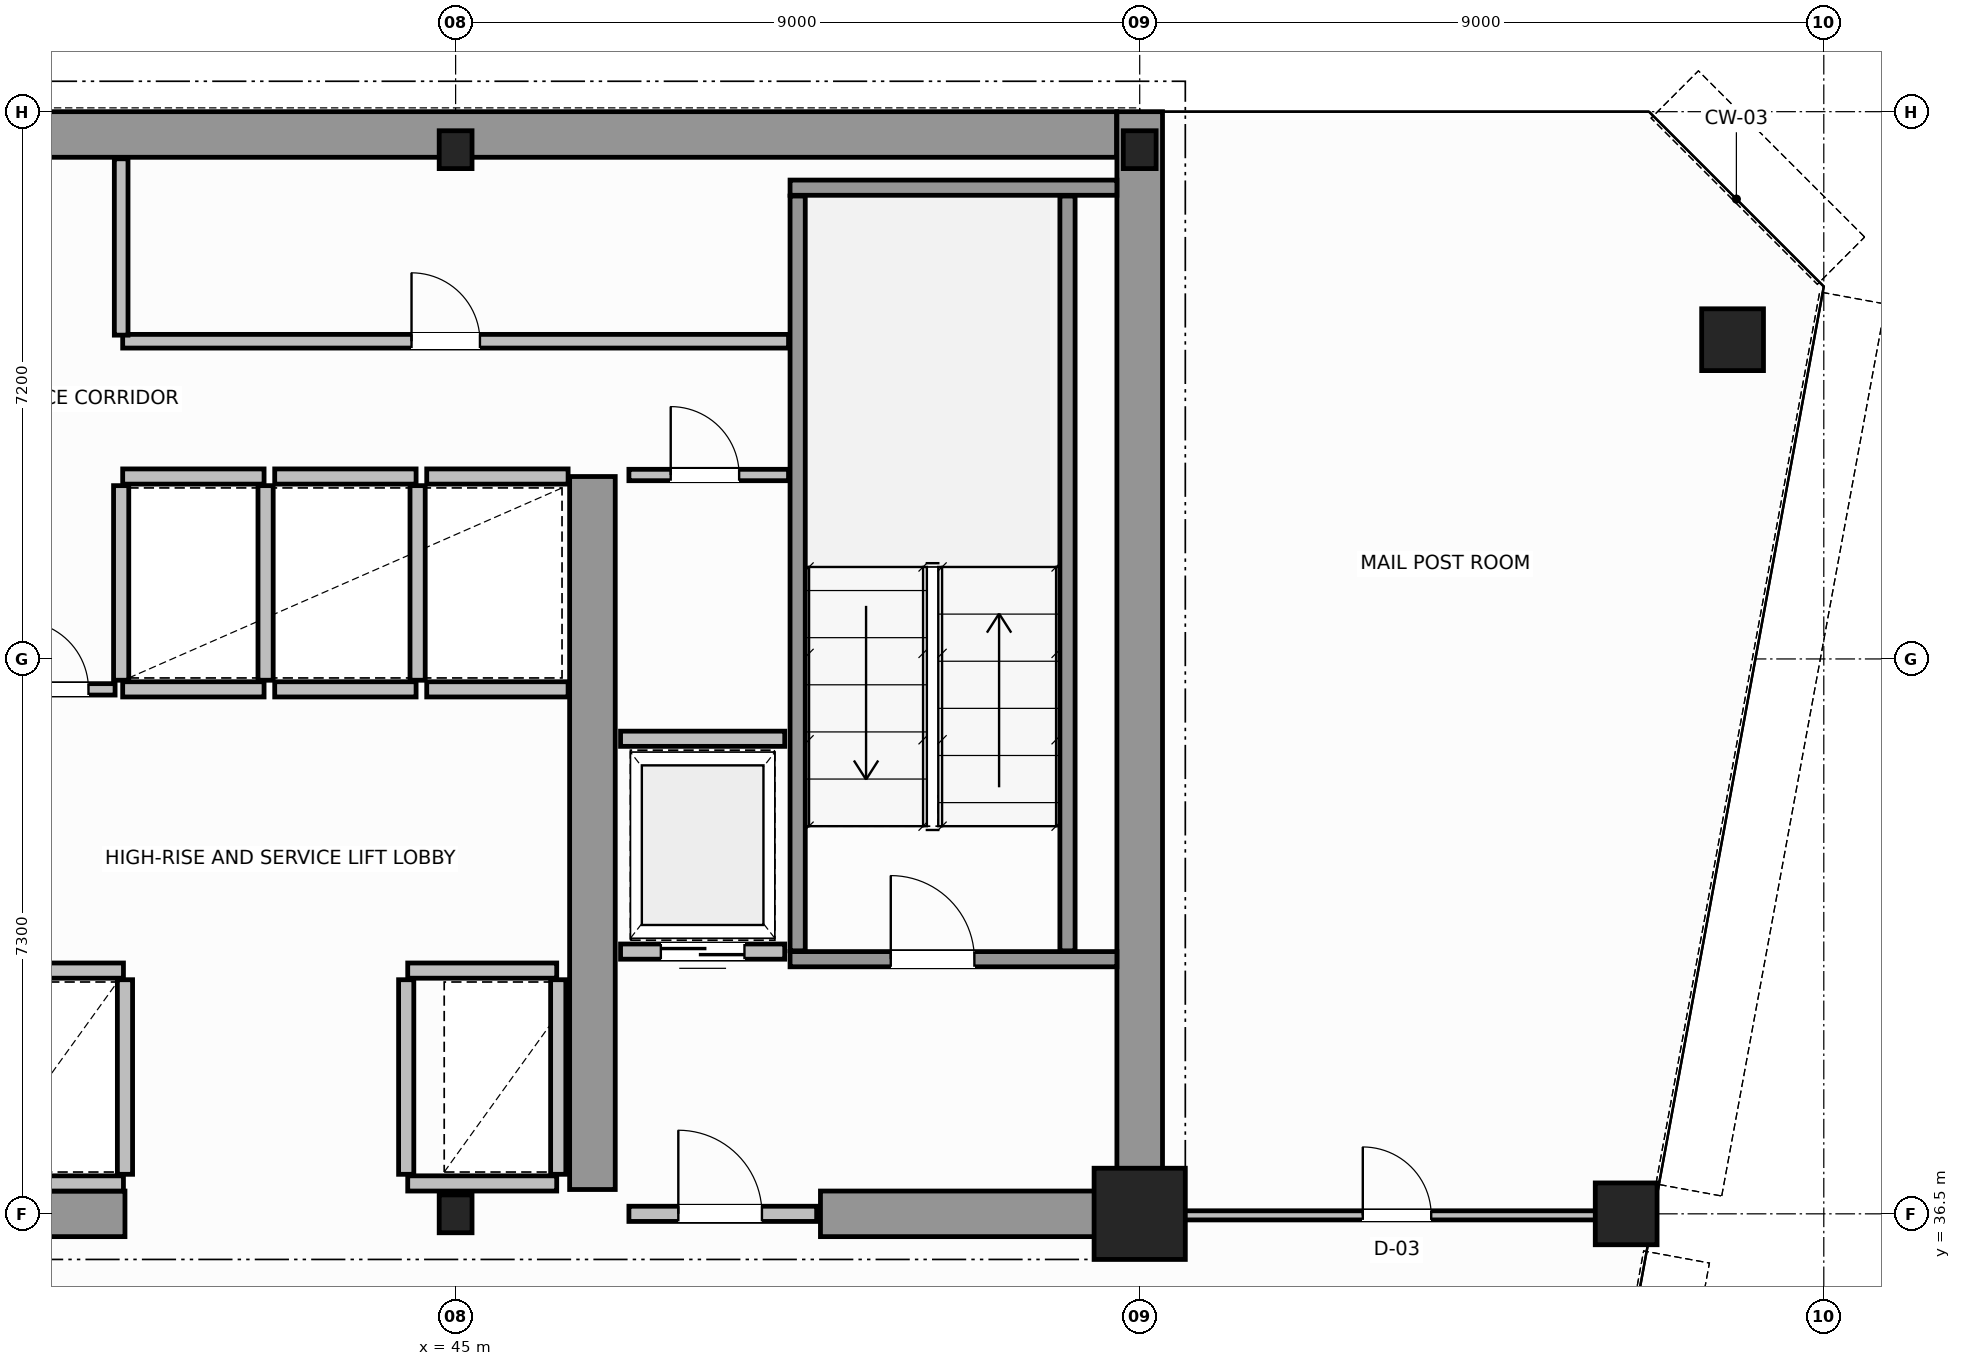
"""IFC4 building model, lengths in metres.
Left out: names, types, materials, properties, quantities, classifications, styles, units other than length and angle.
Written with IfcOpenShell. Run it as: python <this file> out.ifc"""

import sys

from ifc_helpers import new_model, si_unit, direction, frame, frame_2d, origin, origin_2d, place, context, subcontext, project, spatial, rectangle, hollow_circle, i_section, extrude, source, transform, mapped, element, fill, save


model = new_model("IFC4")
c1 = context("Model", 3, precision=1e-05, world=origin(), true_north=direction((0.0, 1.0)))
c2 = subcontext(c1, "Body", "Model", "MODEL_VIEW")
j1 = project(units=[si_unit("LENGTHUNIT", "METRE"), si_unit("PLANEANGLEUNIT", "RADIAN")], contexts=[c1])
p1 = place(None, origin())
s1 = spatial("IfcSite", under=j1, at=p1, CompositionType="ELEMENT")
p2 = place(p1, origin())
s2 = spatial("IfcBuilding", under=s1, at=p2, CompositionType="ELEMENT")
p3 = place(p2, frame((0.0, 0.0, 180.4)))
s3 = spatial("IfcBuildingStorey", under=s2, at=p3, CompositionType="ELEMENT", Elevation=180.4)
m1 = source(origin(), c2, "Body", "SweptSolid", [
    extrude(i_section(OverallWidth=0.432, OverallDepth=0.498, WebThickness=0.055, FlangeThickness=0.068, FilletRadius=0.015, at=origin_2d()), origin(), (0.0, 0.0, 1.0), 3.8),
])
p4 = place(p3, frame((45.0, 36.5, 0.0), z_axis=(0.0, 0.0, 1.0), x_axis=(1.0, 0.0, 0.0)))
e1 = element("IfcColumn", 1, at=p4, inside=s3, PredefinedType="COLUMN", context=c2, shape_type="MappedRepresentation", body=[
    mapped(m1, transform((0.0, 0.0, 0.0), scale=1.0)),
])
m2 = source(origin(), c2, "Body", "SweptSolid", [
    extrude(rectangle(XDim=1.2, YDim=1.2, at=origin_2d()), origin(), (0.0, 0.0, 1.0), 3.8),
])
p5 = place(p3, frame((54.0, 36.5, 0.0), z_axis=(0.0, 0.0, 1.0), x_axis=(1.0, 0.0, 0.0)))
e2 = element("IfcColumn", 2, at=p5, inside=s3, PredefinedType="COLUMN", context=c2, shape_type="MappedRepresentation", body=[
    mapped(m2, transform((0.0, 0.0, 0.0), scale=1.0)),
])
for number, where, z_axis, x_axis in (
    (3, (45.0, 50.5, 0.0), (0.0, 0.0, 1.0), (1.0, 0.0, 0.0)),
    (4, (54.0, 50.5, 0.0), (0.0, 0.0, 1.0), (1.0, 0.0, 0.0)),
):
    element("IfcColumn", number, at=place(p3, frame(where, z_axis=z_axis, x_axis=x_axis)), inside=s3, PredefinedType="COLUMN", context=c2, shape_type="MappedRepresentation", body=[
        mapped(m1, transform((0.0, 0.0, 0.0), scale=1.0)),
    ])
m3 = source(origin(), c2, "Body", "SweptSolid", [
    extrude(hollow_circle(Radius=0.406, WallThickness=0.04, at=origin_2d()), origin(), (0.0, 0.0, 1.0), 3.8),
])
for number, where, z_axis, x_axis in (
    (5, (61.8, 48.0, 0.0), (0.0, 0.0, 1.0), (1.0, 0.0, 0.0)),
    (6, (60.4, 36.5, 0.0), (0.0, 0.0, 1.0), (1.0, 0.0, 0.0)),
):
    element("IfcColumn", number, at=place(p3, frame(where, z_axis=z_axis, x_axis=x_axis)), inside=s3, PredefinedType="COLUMN", context=c2, shape_type="MappedRepresentation", body=[
        mapped(m3, transform((0.0, 0.0, 0.0), scale=1.0)),
    ])
p6 = place(p3, frame((34.002, 50.7, 0.0), z_axis=(0.0, 0.0, 1.0), x_axis=(1.0, 0.0, 0.0)))
e7 = element("IfcWall", 7, at=p6, inside=s3, PredefinedType="SHEAR", context=c2, shape_type="SweptSolid", body=[
    extrude(rectangle(XDim=19.694, YDim=0.6, at=frame_2d((9.847, 0.0))), origin(), (0.0, 0.0, 1.0), 3.8),
])
p7 = place(p3, frame((54.0, 36.5, 0.0), z_axis=(0.0, 0.0, 1.0), x_axis=(0.0, 1.0, 0.0)))
e8 = element("IfcWall", 8, at=p7, inside=s3, PredefinedType="SHEAR", context=c2, shape_type="SweptSolid", body=[
    extrude(rectangle(XDim=14.5, YDim=0.6, at=frame_2d((7.25, 0.0))), origin(), (0.0, 0.0, 1.0), 3.8),
])
p8 = place(p3, frame((36.15, 36.5, 0.0), z_axis=(0.0, 0.0, 1.0), x_axis=(1.0, 0.0, 0.0)))
e9 = element("IfcWall", 9, at=p8, inside=s3, PredefinedType="SHEAR", context=c2, shape_type="SweptSolid", body=[
    extrude(rectangle(XDim=4.5, YDim=0.6, at=frame_2d((2.25, 0.0))), origin(), (0.0, 0.0, 1.0), 3.8),
])
p9 = place(p3, frame((49.8, 36.5, 0.0), z_axis=(0.0, 0.0, 1.0), x_axis=(1.0, 0.0, 0.0)))
e10 = element("IfcWall", 10, at=p9, inside=s3, PredefinedType="SHEAR", context=c2, shape_type="SweptSolid", body=[
    extrude(rectangle(XDim=3.88, YDim=0.6, at=frame_2d((1.94, 0.0))), origin(), (0.0, 0.0, 1.0), 2.58),
])
p10 = place(p3, frame((46.8, 36.82, 0.0), z_axis=(0.0, 0.0, 1.0), x_axis=(0.0, 1.0, 0.0)))
e11 = element("IfcWall", 11, at=p10, inside=s3, PredefinedType="SHEAR", context=c2, shape_type="SweptSolid", body=[
    extrude(rectangle(XDim=9.38, YDim=0.6, at=frame_2d((4.69, 0.0))), origin(), (0.0, 0.0, 1.0), 3.8),
])
p11 = place(p3, frame((49.4, 39.85, 0.0), z_axis=(0.0, 0.0, 1.0), x_axis=(1.0, 0.0, 0.0)))
e12 = element("IfcWall", 12, at=p11, inside=s3, PredefinedType="SOLIDWALL", context=c2, shape_type="SweptSolid", body=[
    extrude(rectangle(XDim=4.3, YDim=0.2, at=frame_2d((2.15, 0.0))), origin(), (0.0, 0.0, 1.0), 3.8),
])
p12 = place(p11, frame((1.325, 0.0, 0.0)))
e13 = element("IfcOpeningElement", 13, at=p12, cuts=e12, PredefinedType="OPENING", context=c2, shape_type="SweptSolid", body=[
    extrude(rectangle(XDim=1.1, YDim=2.15, at=frame_2d((0.55, 1.075))), frame((0.0, 0.11, 0.0), z_axis=(0.0, -1.0, 0.0), x_axis=(1.0, 0.0, 0.0)), (0.0, 0.0, 1.0), 0.22),
])
p13 = place(p3, frame((49.4, 50.0, 0.0), z_axis=(0.0, 0.0, 1.0), x_axis=(1.0, 0.0, 0.0)))
e14 = element("IfcWall", 14, at=p13, inside=s3, PredefinedType="SOLIDWALL", context=c2, shape_type="SweptSolid", body=[
    extrude(rectangle(XDim=4.3, YDim=0.2, at=frame_2d((2.15, 0.0))), origin(), (0.0, 0.0, 1.0), 3.8),
])
for number, where, z_axis, x_axis in (
    (15, (49.5, 39.96, 0.0), (0.0, 0.0, 1.0), (0.0, 1.0, 0.0)),
    (16, (53.05, 39.96, 0.0), (0.0, 0.0, 1.0), (0.0, 1.0, 0.0)),
):
    element("IfcWall", number, at=place(p3, frame(where, z_axis=z_axis, x_axis=x_axis)), inside=s3, PredefinedType="SOLIDWALL", context=c2, shape_type="SweptSolid", body=[
        extrude(rectangle(XDim=9.93, YDim=0.2, at=frame_2d((4.965, 0.0))), origin(), (0.0, 0.0, 1.0), 3.8),
    ])
p14 = place(p3, frame((47.28, 36.5, 0.0), z_axis=(0.0, 0.0, 1.0), x_axis=(1.0, 0.0, 0.0)))
e17 = element("IfcWall", 17, at=p14, inside=s3, PredefinedType="SOLIDWALL", context=c2, shape_type="SweptSolid", body=[
    extrude(rectangle(XDim=2.47, YDim=0.2, at=frame_2d((1.235, 0.0))), origin(), (0.0, 0.0, 1.0), 2.57),
])
p15 = place(p14, frame((0.65, 0.0, 0.0)))
e18 = element("IfcOpeningElement", 18, at=p15, cuts=e17, PredefinedType="OPENING", context=c2, shape_type="SweptSolid", body=[
    extrude(rectangle(XDim=1.1, YDim=2.15, at=frame_2d((0.55, 1.075))), frame((0.0, 0.11, 0.0), z_axis=(0.0, -1.0, 0.0), x_axis=(1.0, 0.0, 0.0)), (0.0, 0.0, 1.0), 0.22),
])
for number, where, z_axis, x_axis in (
    (19, (38.71, 39.7, 0.0), (0.0, 0.0, 1.0), (1.0, 0.0, 0.0)),
    (20, (38.71, 36.9, 0.0), (0.0, 0.0, 1.0), (1.0, 0.0, 0.0)),
):
    element("IfcWall", number, at=place(p3, frame(where, z_axis=z_axis, x_axis=x_axis)), inside=s3, PredefinedType="SOLIDWALL", context=c2, shape_type="SweptSolid", body=[
        extrude(rectangle(XDim=1.92, YDim=0.2, at=frame_2d((0.96, 0.0))), origin(), (0.0, 0.0, 1.0), 3.58),
    ])
p16 = place(p3, frame((40.65, 37.02, 0.0), z_axis=(0.0, 0.0, 1.0), x_axis=(0.0, 1.0, 0.0)))
e21 = element("IfcWall", 21, at=p16, inside=s3, PredefinedType="SOLIDWALL", context=c2, shape_type="SweptSolid", body=[
    extrude(rectangle(XDim=2.56, YDim=0.2, at=frame_2d((1.28, 0.0))), origin(), (0.0, 0.0, 1.0), 3.58),
])
p17 = place(p3, frame((44.37, 39.7, 0.0), z_axis=(0.0, 0.0, 1.0), x_axis=(1.0, 0.0, 0.0)))
e22 = element("IfcWall", 22, at=p17, inside=s3, PredefinedType="SOLIDWALL", context=c2, shape_type="SweptSolid", body=[
    extrude(rectangle(XDim=1.96, YDim=0.2, at=frame_2d((0.98, 0.0))), origin(), (0.0, 0.0, 1.0), 3.58),
])
p18 = place(p3, frame((44.37, 36.9, 0.0), z_axis=(0.0, 0.0, 1.0), x_axis=(1.0, 0.0, 0.0)))
e23 = element("IfcWall", 23, at=p18, inside=s3, PredefinedType="SOLIDWALL", context=c2, shape_type="SweptSolid", body=[
    extrude(rectangle(XDim=1.96, YDim=0.2, at=frame_2d((0.98, 0.0))), origin(), (0.0, 0.0, 1.0), 2.57),
])
for number, where, z_axis, x_axis in (
    (24, (44.35, 37.02, 0.0), (0.0, 0.0, 1.0), (0.0, 1.0, 0.0)),
    (25, (46.35, 37.02, 0.0), (0.0, 0.0, 1.0), (0.0, 1.0, 0.0)),
):
    element("IfcWall", number, at=place(p3, frame(where, z_axis=z_axis, x_axis=x_axis)), inside=s3, PredefinedType="SOLIDWALL", context=c2, shape_type="SweptSolid", body=[
        extrude(rectangle(XDim=2.56, YDim=0.2, at=frame_2d((1.28, 0.0))), origin(), (0.0, 0.0, 1.0), 3.58),
    ])
for number, where, z_axis, x_axis in (
    (26, (40.62, 43.4, 0.0), (0.0, 0.0, 1.0), (1.0, 0.0, 0.0)),
    (27, (40.62, 46.2, 0.0), (0.0, 0.0, 1.0), (1.0, 0.0, 0.0)),
):
    element("IfcWall", number, at=place(p3, frame(where, z_axis=z_axis, x_axis=x_axis)), inside=s3, PredefinedType="SOLIDWALL", context=c2, shape_type="SweptSolid", body=[
        extrude(rectangle(XDim=1.86, YDim=0.2, at=frame_2d((0.93, 0.0))), origin(), (0.0, 0.0, 1.0), 3.58),
    ])
for number, where, z_axis, x_axis in (
    (28, (40.6, 43.52, 0.0), (0.0, 0.0, 1.0), (0.0, 1.0, 0.0)),
    (29, (42.5, 43.52, 0.0), (0.0, 0.0, 1.0), (0.0, 1.0, 0.0)),
):
    element("IfcWall", number, at=place(p3, frame(where, z_axis=z_axis, x_axis=x_axis)), inside=s3, PredefinedType="SOLIDWALL", context=c2, shape_type="SweptSolid", body=[
        extrude(rectangle(XDim=2.56, YDim=0.2, at=frame_2d((1.28, 0.0))), origin(), (0.0, 0.0, 1.0), 3.58),
    ])
for number, where, z_axis, x_axis in (
    (30, (42.62, 43.4, 0.0), (0.0, 0.0, 1.0), (1.0, 0.0, 0.0)),
    (31, (42.62, 46.2, 0.0), (0.0, 0.0, 1.0), (1.0, 0.0, 0.0)),
):
    element("IfcWall", number, at=place(p3, frame(where, z_axis=z_axis, x_axis=x_axis)), inside=s3, PredefinedType="SOLIDWALL", context=c2, shape_type="SweptSolid", body=[
        extrude(rectangle(XDim=1.86, YDim=0.2, at=frame_2d((0.93, 0.0))), origin(), (0.0, 0.0, 1.0), 3.58),
    ])
p19 = place(p3, frame((44.5, 43.52, 0.0), z_axis=(0.0, 0.0, 1.0), x_axis=(0.0, 1.0, 0.0)))
e32 = element("IfcWall", 32, at=p19, inside=s3, PredefinedType="SOLIDWALL", context=c2, shape_type="SweptSolid", body=[
    extrude(rectangle(XDim=2.56, YDim=0.2, at=frame_2d((1.28, 0.0))), origin(), (0.0, 0.0, 1.0), 3.58),
])
for number, where, z_axis, x_axis in (
    (33, (44.62, 43.4, 0.0), (0.0, 0.0, 1.0), (1.0, 0.0, 0.0)),
    (34, (44.62, 46.2, 0.0), (0.0, 0.0, 1.0), (1.0, 0.0, 0.0)),
):
    element("IfcWall", number, at=place(p3, frame(where, z_axis=z_axis, x_axis=x_axis)), inside=s3, PredefinedType="SOLIDWALL", context=c2, shape_type="SweptSolid", body=[
        extrude(rectangle(XDim=1.86, YDim=0.2, at=frame_2d((0.93, 0.0))), origin(), (0.0, 0.0, 1.0), 3.58),
    ])
p20 = place(p3, frame((47.17, 39.95, 0.0), z_axis=(0.0, 0.0, 1.0), x_axis=(1.0, 0.0, 0.0)))
e35 = element("IfcWall", 35, at=p20, inside=s3, PredefinedType="SOLIDWALL", context=c2, shape_type="SweptSolid", body=[
    extrude(rectangle(XDim=2.16, YDim=0.2, at=frame_2d((1.08, 0.0))), origin(), (0.0, 0.0, 1.0), 3.58),
])
p21 = place(p20, frame((0.53, 0.0, 0.0)))
e36 = element("IfcOpeningElement", 36, at=p21, cuts=e35, PredefinedType="OPENING", context=c2, shape_type="SweptSolid", body=[
    extrude(rectangle(XDim=1.1, YDim=2.15, at=frame_2d((0.55, 1.075))), frame((0.0, 0.11, 0.0), z_axis=(0.0, -1.0, 0.0), x_axis=(1.0, 0.0, 0.0)), (0.0, 0.0, 1.0), 0.22),
])
p22 = place(p3, frame((47.17, 42.75, 0.0), z_axis=(0.0, 0.0, 1.0), x_axis=(1.0, 0.0, 0.0)))
e37 = element("IfcWall", 37, at=p22, inside=s3, PredefinedType="SOLIDWALL", context=c2, shape_type="SweptSolid", body=[
    extrude(rectangle(XDim=2.16, YDim=0.2, at=frame_2d((1.08, 0.0))), origin(), (0.0, 0.0, 1.0), 3.58),
])
p23 = place(p3, frame((47.28, 46.22, 0.0), z_axis=(0.0, 0.0, 1.0), x_axis=(1.0, 0.0, 0.0)))
e38 = element("IfcWall", 38, at=p23, inside=s3, PredefinedType="PARTITIONING", context=c2, shape_type="SweptSolid", body=[
    extrude(rectangle(XDim=2.1, YDim=0.15, at=frame_2d((1.05, 0.0))), origin(), (0.0, 0.0, 1.0), 3.58),
])
p24 = place(p23, frame((0.55, 0.0, 0.0)))
e39 = element("IfcOpeningElement", 39, at=p24, cuts=e38, PredefinedType="OPENING", context=c2, shape_type="SweptSolid", body=[
    extrude(rectangle(XDim=0.9, YDim=2.1, at=frame_2d((0.45, 1.05))), frame((0.0, 0.085, 0.0), z_axis=(0.0, -1.0, 0.0), x_axis=(1.0, 0.0, 0.0)), (0.0, 0.0, 1.0), 0.17),
])
p25 = place(p3, frame((38.92, 43.4, 0.0), z_axis=(0.0, 0.0, 1.0), x_axis=(1.0, 0.0, 0.0)))
e40 = element("IfcWall", 40, at=p25, inside=s3, PredefinedType="PARTITIONING", context=c2, shape_type="SweptSolid", body=[
    extrude(rectangle(XDim=1.6, YDim=0.15, at=frame_2d((0.8, 0.0))), origin(), (0.0, 0.0, 1.0), 3.58),
])
p26 = place(p25, frame((0.35, 0.0, 0.0)))
e41 = element("IfcOpeningElement", 41, at=p26, cuts=e40, PredefinedType="OPENING", context=c2, shape_type="SweptSolid", body=[
    extrude(rectangle(XDim=0.9, YDim=2.1, at=frame_2d((0.45, 1.05))), frame((0.0, 0.085, 0.0), z_axis=(0.0, -1.0, 0.0), x_axis=(1.0, 0.0, 0.0)), (0.0, 0.0, 1.0), 0.17),
])
p27 = place(p3, frame((40.62, 47.98, 0.0), z_axis=(0.0, 0.0, 1.0), x_axis=(1.0, 0.0, 0.0)))
e42 = element("IfcWall", 42, at=p27, inside=s3, PredefinedType="PLUMBINGWALL", context=c2, shape_type="SweptSolid", body=[
    extrude(rectangle(XDim=8.76, YDim=0.18, at=frame_2d((4.38, 0.0))), origin(), (0.0, 0.0, 1.0), 3.58),
])
p28 = place(p27, frame((3.8, 0.0, 0.0)))
e43 = element("IfcOpeningElement", 43, at=p28, cuts=e42, PredefinedType="OPENING", context=c2, shape_type="SweptSolid", body=[
    extrude(rectangle(XDim=0.9, YDim=2.15, at=frame_2d((0.45, 1.075))), frame((0.0, 0.1, 0.0), z_axis=(0.0, -1.0, 0.0), x_axis=(1.0, 0.0, 0.0)), (0.0, 0.0, 1.0), 0.2),
])
p29 = place(p3, frame((40.6, 48.06, 0.0), z_axis=(0.0, 0.0, 1.0), x_axis=(0.0, 1.0, 0.0)))
e44 = element("IfcWall", 44, at=p29, inside=s3, PredefinedType="PLUMBINGWALL", context=c2, shape_type="SweptSolid", body=[
    extrude(rectangle(XDim=2.32, YDim=0.18, at=frame_2d((1.16, 0.0))), origin(), (0.0, 0.0, 1.0), 3.58),
])
p30 = place(p3, frame((54.06, 36.48, 0.0), z_axis=(0.0, 0.0, 1.0), x_axis=(1.0, 0.0, 0.0)))
e45 = element("IfcWall", 45, at=p30, inside=s3, PredefinedType="PARTITIONING", context=c2, shape_type="SweptSolid", body=[
    extrude(rectangle(XDim=6.651, YDim=0.12, at=frame_2d((3.325, 0.0))), origin(), (0.0, 0.0, 1.0), 2.97),
])
p31 = place(p30, frame((2.875, 0.0, 0.0)))
e46 = element("IfcOpeningElement", 46, at=p31, cuts=e45, PredefinedType="OPENING", context=c2, shape_type="SweptSolid", body=[
    extrude(rectangle(XDim=0.9, YDim=2.15, at=frame_2d((0.45, 1.075))), frame((0.0, 0.07, 0.0), z_axis=(0.0, -1.0, 0.0), x_axis=(1.0, 0.0, 0.0)), (0.0, 0.0, 1.0), 0.14),
])
m4 = source(origin(), c2, "Body", "SweptSolid", [
    extrude(rectangle(XDim=1.1, YDim=2.15, at=frame_2d((0.55, 1.075))), frame((0.0, 0.025, 0.0), z_axis=(0.0, -1.0, 0.0), x_axis=(1.0, 0.0, 0.0)), (0.0, 0.0, 1.0), 0.05),
])
p32 = place(p12, origin())
e47 = element("IfcDoor", 47, at=p32, inside=s3, OperationType="SINGLE_SWING_RIGHT", PredefinedType="DOOR", context=c2, shape_type="MappedRepresentation", body=[
    mapped(m4, transform((0.0, 0.0, 0.0), scale=1.0)),
])
fill(e13, e47)
p33 = place(p15, origin())
e48 = element("IfcDoor", 48, at=p33, inside=s3, OperationType="SINGLE_SWING_LEFT", PredefinedType="DOOR", context=c2, shape_type="MappedRepresentation", body=[
    mapped(m4, transform((0.0, 0.0, 0.0), scale=1.0)),
])
fill(e18, e48)
p34 = place(p21, origin())
e49 = element("IfcDoor", 49, at=p34, inside=s3, OperationType="DOUBLE_DOOR_SLIDING", PredefinedType="DOOR", context=c2, shape_type="MappedRepresentation", body=[
    mapped(m4, transform((0.0, 0.0, 0.0), scale=1.0)),
])
fill(e36, e49)
m5 = source(origin(), c2, "Body", "SweptSolid", [
    extrude(rectangle(XDim=0.9, YDim=2.1, at=frame_2d((0.45, 1.05))), frame((0.0, 0.025, 0.0), z_axis=(0.0, -1.0, 0.0), x_axis=(1.0, 0.0, 0.0)), (0.0, 0.0, 1.0), 0.05),
])
p35 = place(p24, origin())
e50 = element("IfcDoor", 50, at=p35, inside=s3, OperationType="SINGLE_SWING_RIGHT", PredefinedType="DOOR", context=c2, shape_type="MappedRepresentation", body=[
    mapped(m5, transform((0.0, 0.0, 0.0), scale=1.0)),
])
fill(e39, e50)
p36 = place(p26, origin())
e51 = element("IfcDoor", 51, at=p36, inside=s3, OperationType="SINGLE_SWING_LEFT", PredefinedType="DOOR", context=c2, shape_type="MappedRepresentation", body=[
    mapped(m5, transform((0.0, 0.0, 0.0), scale=1.0)),
])
fill(e41, e51)
m6 = source(origin(), c2, "Body", "SweptSolid", [
    extrude(rectangle(XDim=0.9, YDim=2.15, at=frame_2d((0.45, 1.075))), frame((0.0, 0.025, 0.0), z_axis=(0.0, -1.0, 0.0), x_axis=(1.0, 0.0, 0.0)), (0.0, 0.0, 1.0), 0.05),
])
p37 = place(p28, origin())
e52 = element("IfcDoor", 52, at=p37, inside=s3, OperationType="SINGLE_SWING_RIGHT", PredefinedType="DOOR", context=c2, shape_type="MappedRepresentation", body=[
    mapped(m6, transform((0.0, 0.0, 0.0), scale=1.0)),
])
fill(e43, e52)
p38 = place(p31, origin())
e53 = element("IfcDoor", 53, at=p38, inside=s3, OperationType="SINGLE_SWING_RIGHT", PredefinedType="DOOR", context=c2, shape_type="MappedRepresentation", body=[
    mapped(m6, transform((0.0, 0.0, 0.0), scale=1.0)),
])
fill(e46, e53)
save(model, sys.argv[1])
